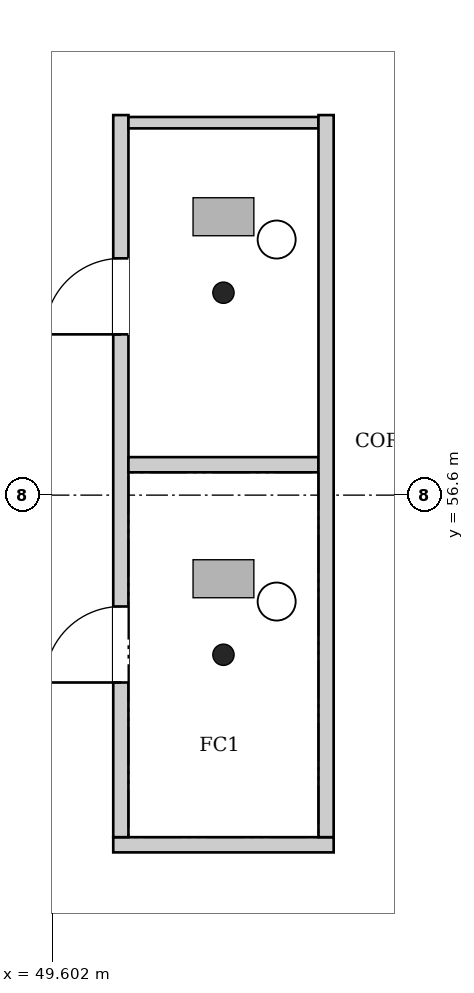
"""IFC4 building model, lengths in metres.
Left out: names, types, materials, properties, quantities, classifications, styles, units other than length and angle.
Written with IfcOpenShell. Run it as: python <this file> out.ifc"""

import sys

from ifc_helpers import new_model, si_unit, direction, frame, frame_2d, origin, place, context, subcontext, project, spatial, rectangle, extrude, element, fill, save


model = new_model("IFC4")
c1 = context("Model", 3, precision=1e-05, world=origin(), true_north=direction((0.0, 1.0)))
c2 = subcontext(c1, "Body", "Model", "MODEL_VIEW")
j1 = project(units=[si_unit("LENGTHUNIT", "METRE"), si_unit("PLANEANGLEUNIT", "RADIAN")], contexts=[c1])
p1 = place(None, origin())
s1 = spatial("IfcSite", under=j1, at=p1, CompositionType="ELEMENT")
p2 = place(p1, origin())
s2 = spatial("IfcBuilding", under=s1, at=p2, CompositionType="ELEMENT")
p3 = place(p2, frame((0.0, 0.0, 26.7)))
s3 = spatial("IfcBuildingStorey", under=s2, at=p3, CompositionType="ELEMENT", Elevation=26.7)
p4 = place(p3, frame((50.4, 52.0, 0.0), z_axis=(0.0, 0.0, 1.0), x_axis=(1.0, 0.0, 0.0)))
e1 = element("IfcWall", 1, at=p4, inside=s3, PredefinedType="PARTITIONING", context=c2, shape_type="SweptSolid", body=[
    extrude(rectangle(XDim=2.9, YDim=0.2, at=frame_2d((1.45, 0.0))), origin(), (0.0, 0.0, 1.0), 4.85),
])
p5 = place(p3, frame((50.5, 52.1, 0.0), z_axis=(0.0, 0.0, 1.0), x_axis=(0.0, 1.0, 0.0)))
e2 = element("IfcWall", 2, at=p5, inside=s3, PredefinedType="PARTITIONING", context=c2, shape_type="SweptSolid", body=[
    extrude(rectangle(XDim=9.5, YDim=0.2, at=frame_2d((4.75, 0.0))), origin(), (0.0, 0.0, 1.0), 4.85),
])
p6 = place(p5, frame((2.035, 0.0, 0.0)))
e3 = element("IfcOpeningElement", 3, at=p6, cuts=e2, PredefinedType="OPENING", context=c2, shape_type="SweptSolid", body=[
    extrude(rectangle(XDim=1.0, YDim=2.1, at=frame_2d((0.5, 1.05))), frame((0.0, 0.11, 0.0), z_axis=(0.0, -1.0, 0.0), x_axis=(1.0, 0.0, 0.0)), (0.0, 0.0, 1.0), 0.22),
])
p7 = place(p5, frame((6.615, 0.0, 0.0)))
e4 = element("IfcOpeningElement", 4, at=p7, cuts=e2, PredefinedType="OPENING", context=c2, shape_type="SweptSolid", body=[
    extrude(rectangle(XDim=1.0, YDim=2.1, at=frame_2d((0.5, 1.05))), frame((0.0, 0.11, 0.0), z_axis=(0.0, -1.0, 0.0), x_axis=(1.0, 0.0, 0.0)), (0.0, 0.0, 1.0), 0.22),
])
p8 = place(p3, frame((50.6, 57.0, 0.0), z_axis=(0.0, 0.0, 1.0), x_axis=(1.0, 0.0, 0.0)))
e5 = element("IfcWall", 5, at=p8, inside=s3, PredefinedType="PARTITIONING", context=c2, shape_type="SweptSolid", body=[
    extrude(rectangle(XDim=2.5, YDim=0.2, at=frame_2d((1.25, 0.0))), origin(), (0.0, 0.0, 1.0), 4.45),
])
p9 = place(p3, frame((50.6, 61.5, 0.0), z_axis=(0.0, 0.0, 1.0), x_axis=(1.0, 0.0, 0.0)))
e6 = element("IfcWall", 6, at=p9, inside=s3, PredefinedType="PARTITIONING", context=c2, shape_type="SweptSolid", body=[
    extrude(rectangle(XDim=2.5, YDim=0.15, at=frame_2d((1.25, 0.0))), origin(), (0.0, 0.0, 1.0), 4.85),
])
p10 = place(p3, frame((53.2, 52.1, 0.0), z_axis=(0.0, 0.0, 1.0), x_axis=(0.0, 1.0, 0.0)))
e7 = element("IfcWall", 7, at=p10, inside=s3, PredefinedType="PARTITIONING", context=c2, shape_type="SweptSolid", body=[
    extrude(rectangle(XDim=9.5, YDim=0.2, at=frame_2d((4.75, 0.0))), origin(), (0.0, 0.0, 1.0), 4.85),
])
p11 = place(p6, origin())
e8 = element("IfcDoor", 8, at=p11, inside=s3, OperationType="SINGLE_SWING_RIGHT", PredefinedType="DOOR", context=c2, shape_type="SweptSolid", body=[
    extrude(rectangle(XDim=1.0, YDim=2.1, at=frame_2d((0.5, 1.05))), frame((0.0, 0.025, 0.0), z_axis=(0.0, -1.0, 0.0), x_axis=(1.0, 0.0, 0.0)), (0.0, 0.0, 1.0), 0.05),
])
fill(e3, e8)
p12 = place(p7, origin())
e9 = element("IfcDoor", 9, at=p12, inside=s3, OperationType="SINGLE_SWING_LEFT", PredefinedType="DOOR", context=c2, shape_type="SweptSolid", body=[
    extrude(rectangle(XDim=1.0, YDim=2.1, at=frame_2d((0.5, 1.05))), frame((0.0, 0.025, 0.0), z_axis=(0.0, -1.0, 0.0), x_axis=(1.0, 0.0, 0.0)), (0.0, 0.0, 1.0), 0.05),
])
fill(e4, e9)
save(model, sys.argv[1])
